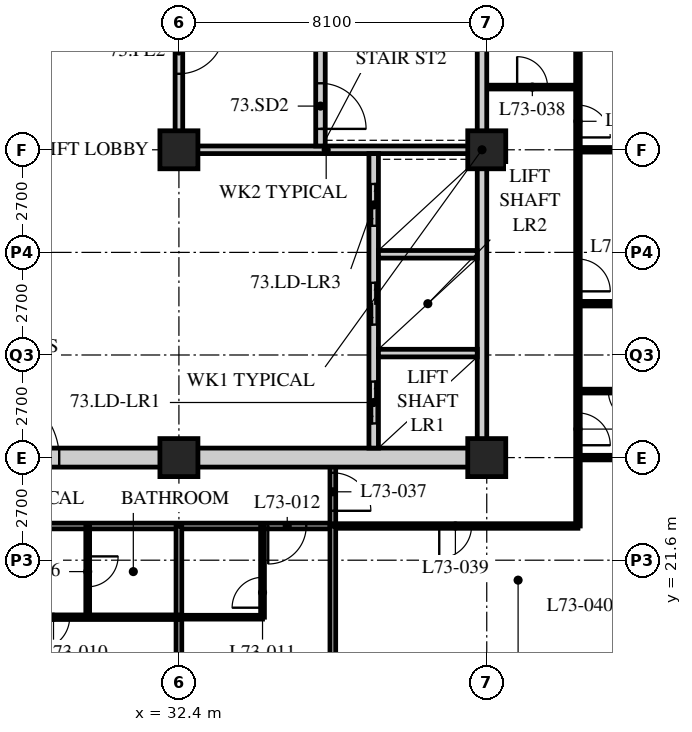
"""IFC4 building model, lengths in metres.
Left out: names, types, materials, properties, quantities, classifications, styles, units other than length and angle.
Written with IfcOpenShell. Run it as: python <this file> out.ifc"""

import sys

from ifc_helpers import new_model, si_unit, direction, frame, frame_2d, origin, origin_2d, place, context, subcontext, project, spatial, rectangle, hollow_rectangle, extrude, element, fill, save


model = new_model("IFC4")
c1 = context("Model", 3, precision=1e-05, world=origin(), true_north=direction((0.0, 1.0)))
c2 = subcontext(c1, "Body", "Model", "MODEL_VIEW")
j1 = project(units=[si_unit("LENGTHUNIT", "METRE"), si_unit("PLANEANGLEUNIT", "RADIAN")], contexts=[c1])
p1 = place(None, origin())
s1 = spatial("IfcSite", under=j1, at=p1, CompositionType="ELEMENT")
p2 = place(p1, origin())
s2 = spatial("IfcBuilding", under=s1, at=p2, CompositionType="ELEMENT")
p3 = place(p2, frame((0.0, 0.0, 285.3)))
s3 = spatial("IfcBuildingStorey", under=s2, at=p3, CompositionType="ELEMENT", Elevation=285.3)
for number, where, z_axis, x_axis in (
    (1, (32.4, 24.3, 0.0), (0.0, 0.0, 1.0), (1.0, 0.0, 0.0)),
    (2, (32.4, 32.4, 0.0), (0.0, 0.0, 1.0), (1.0, 0.0, 0.0)),
    (3, (40.5, 24.3, 0.0), (0.0, 0.0, 1.0), (1.0, 0.0, 0.0)),
    (4, (40.5, 32.4, 0.0), (0.0, 0.0, 1.0), (1.0, 0.0, 0.0)),
):
    element("IfcColumn", number, at=place(p3, frame(where, z_axis=z_axis, x_axis=x_axis)), inside=s3, PredefinedType="COLUMN", context=c2, shape_type="SweptSolid", body=[
        extrude(hollow_rectangle(XDim=1.0, YDim=1.0, WallThickness=0.1, at=origin_2d()), origin(), (0.0, 0.0, 1.0), 3.9),
    ])
p4 = place(p3, frame((12.15, 22.5, 0.0), z_axis=(0.0, 0.0, 1.0), x_axis=(1.0, 0.0, 0.0)))
e5 = element("IfcWall", 5, at=p4, inside=s3, PredefinedType="PARTITIONING", context=c2, shape_type="SweptSolid", body=[
    extrude(rectangle(XDim=24.3, YDim=0.15, at=frame_2d((12.15, 0.0))), origin(), (0.0, 0.0, 1.0), 3.69),
])
p5 = place(p4, frame((4.45, 0.0, 0.0)))
e6 = element("IfcOpeningElement", 6, at=p5, cuts=e5, PredefinedType="OPENING", context=c2, shape_type="SweptSolid", body=[
    extrude(rectangle(XDim=1.0, YDim=2.1, at=frame_2d((0.5, 1.05))), frame((0.0, 0.085, 0.0), z_axis=(0.0, -1.0, 0.0), x_axis=(1.0, 0.0, 0.0)), (0.0, 0.0, 1.0), 0.17),
])
p6 = place(p4, frame((22.6, 0.0, 0.0)))
e7 = element("IfcOpeningElement", 7, at=p6, cuts=e5, PredefinedType="OPENING", context=c2, shape_type="SweptSolid", body=[
    extrude(rectangle(XDim=1.0, YDim=2.1, at=frame_2d((0.5, 1.05))), frame((0.0, 0.085, 0.0), z_axis=(0.0, -1.0, 0.0), x_axis=(1.0, 0.0, 0.0)), (0.0, 0.0, 1.0), 0.17),
])
p7 = place(p4, frame((2.625, 0.0, 0.0)))
e8 = element("IfcOpeningElement", 8, at=p7, cuts=e5, PredefinedType="OPENING", context=c2, shape_type="SweptSolid", body=[
    extrude(rectangle(XDim=1.0, YDim=2.1, at=frame_2d((0.5, 1.05))), frame((0.0, 0.085, 0.0), z_axis=(0.0, -1.0, 0.0), x_axis=(1.0, 0.0, 0.0)), (0.0, 0.0, 1.0), 0.17),
])
p8 = place(p3, frame((36.45, 22.5, 0.0), z_axis=(0.0, 0.0, 1.0), x_axis=(0.0, 1.0, 0.0)))
e9 = element("IfcWall", 9, at=p8, inside=s3, PredefinedType="PARTITIONING", context=c2, shape_type="SweptSolid", body=[
    extrude(rectangle(XDim=1.8, YDim=0.15, at=frame_2d((0.9, 0.0))), origin(), (0.0, 0.0, 1.0), 3.69),
])
p9 = place(p8, frame((0.4, 0.0, 0.0)))
e10 = element("IfcOpeningElement", 10, at=p9, cuts=e9, PredefinedType="OPENING", context=c2, shape_type="SweptSolid", body=[
    extrude(rectangle(XDim=1.0, YDim=2.1, at=frame_2d((0.5, 1.05))), frame((0.0, 0.085, 0.0), z_axis=(0.0, -1.0, 0.0), x_axis=(1.0, 0.0, 0.0)), (0.0, 0.0, 1.0), 0.17),
])
p10 = place(p3, frame((30.0, 22.5, 0.0), z_axis=(0.0, 0.0, 1.0), x_axis=(0.0, -1.0, 0.0)))
e11 = element("IfcWall", 11, at=p10, inside=s3, PredefinedType="PARTITIONING", context=c2, shape_type="SweptSolid", body=[
    extrude(rectangle(XDim=2.4, YDim=0.1, at=frame_2d((1.2, 0.0))), origin(), (0.0, 0.0, 1.0), 3.69),
])
p11 = place(p10, frame((0.8, 0.0, 0.0)))
e12 = element("IfcOpeningElement", 12, at=p11, cuts=e11, PredefinedType="OPENING", context=c2, shape_type="SweptSolid", body=[
    extrude(rectangle(XDim=0.8, YDim=2.1, at=frame_2d((0.4, 1.05))), frame((0.0, 0.06, 0.0), z_axis=(0.0, -1.0, 0.0), x_axis=(1.0, 0.0, 0.0)), (0.0, 0.0, 1.0), 0.12),
])
p12 = place(p3, frame((32.4, 22.5, 0.0), z_axis=(0.0, 0.0, 1.0), x_axis=(0.0, -1.0, 0.0)))
e13 = element("IfcWall", 13, at=p12, inside=s3, PredefinedType="PARTITIONING", context=c2, shape_type="SweptSolid", body=[
    extrude(rectangle(XDim=6.0, YDim=0.15, at=frame_2d((3.0, 0.0))), origin(), (0.0, 0.0, 1.0), 3.078),
])
p13 = place(p3, frame((32.4, 20.1, 0.0), z_axis=(0.0, 0.0, 1.0), x_axis=(1.0, 0.0, 0.0)))
e14 = element("IfcWall", 14, at=p13, inside=s3, PredefinedType="PARTITIONING", context=c2, shape_type="SweptSolid", body=[
    extrude(rectangle(XDim=2.2, YDim=0.1, at=frame_2d((1.1, 0.0))), origin(), (0.0, 0.0, 1.0), 3.69),
])
p14 = place(p3, frame((34.6, 22.5, 0.0), z_axis=(0.0, 0.0, 1.0), x_axis=(0.0, -1.0, 0.0)))
e15 = element("IfcWall", 15, at=p14, inside=s3, PredefinedType="PARTITIONING", context=c2, shape_type="SweptSolid", body=[
    extrude(rectangle(XDim=2.4, YDim=0.1, at=frame_2d((1.2, 0.0))), origin(), (0.0, 0.0, 1.0), 3.69),
])
p15 = place(p14, frame((1.35, 0.0, 0.0)))
e16 = element("IfcOpeningElement", 16, at=p15, cuts=e15, PredefinedType="OPENING", context=c2, shape_type="SweptSolid", body=[
    extrude(rectangle(XDim=0.8, YDim=2.1, at=frame_2d((0.4, 1.05))), frame((0.0, 0.06, 0.0), z_axis=(0.0, -1.0, 0.0), x_axis=(1.0, 0.0, 0.0)), (0.0, 0.0, 1.0), 0.12),
])
p16 = place(p3, frame((12.15, 20.1, 0.0), z_axis=(0.0, 0.0, 1.0), x_axis=(1.0, 0.0, 0.0)))
e17 = element("IfcWall", 17, at=p16, inside=s3, PredefinedType="PARTITIONING", context=c2, shape_type="SweptSolid", body=[
    extrude(rectangle(XDim=20.25, YDim=0.12, at=frame_2d((10.125, 0.0))), origin(), (0.0, 0.0, 1.0), 3.69),
])
p17 = place(p16, frame((5.025, 0.0, 0.0)))
e18 = element("IfcOpeningElement", 18, at=p17, cuts=e17, PredefinedType="OPENING", context=c2, shape_type="SweptSolid", body=[
    extrude(rectangle(XDim=0.85, YDim=2.1, at=frame_2d((0.425, 1.05))), frame((0.0, 0.07, 0.0), z_axis=(0.0, -1.0, 0.0), x_axis=(1.0, 0.0, 0.0)), (0.0, 0.0, 1.0), 0.14),
])
p18 = place(p16, frame((12.475, 0.0, 0.0)))
e19 = element("IfcOpeningElement", 19, at=p18, cuts=e17, PredefinedType="OPENING", context=c2, shape_type="SweptSolid", body=[
    extrude(rectangle(XDim=0.85, YDim=2.1, at=frame_2d((0.425, 1.05))), frame((0.0, 0.07, 0.0), z_axis=(0.0, -1.0, 0.0), x_axis=(1.0, 0.0, 0.0)), (0.0, 0.0, 1.0), 0.14),
])
p19 = place(p16, frame((16.525, 0.0, 0.0)))
e20 = element("IfcOpeningElement", 20, at=p19, cuts=e17, PredefinedType="OPENING", context=c2, shape_type="SweptSolid", body=[
    extrude(rectangle(XDim=0.85, YDim=2.1, at=frame_2d((0.425, 1.05))), frame((0.0, 0.07, 0.0), z_axis=(0.0, -1.0, 0.0), x_axis=(1.0, 0.0, 0.0)), (0.0, 0.0, 1.0), 0.14),
])
p20 = place(p16, frame((2.725, 0.0, 0.0)))
e21 = element("IfcOpeningElement", 21, at=p20, cuts=e17, PredefinedType="OPENING", context=c2, shape_type="SweptSolid", body=[
    extrude(rectangle(XDim=0.85, YDim=2.1, at=frame_2d((0.425, 1.05))), frame((0.0, 0.07, 0.0), z_axis=(0.0, -1.0, 0.0), x_axis=(1.0, 0.0, 0.0)), (0.0, 0.0, 1.0), 0.14),
])
p21 = place(p3, frame((40.5, 34.05, 0.0), z_axis=(0.0, 0.0, 1.0), x_axis=(1.0, 0.0, 0.0)))
e22 = element("IfcWall", 22, at=p21, inside=s3, PredefinedType="PARTITIONING", context=c2, shape_type="SweptSolid", body=[
    extrude(rectangle(XDim=2.4, YDim=0.1, at=frame_2d((1.2, 0.0))), origin(), (0.0, 0.0, 1.0), 3.69),
])
p22 = place(p21, frame((0.8, 0.0, 0.0)))
e23 = element("IfcOpeningElement", 23, at=p22, cuts=e22, PredefinedType="OPENING", context=c2, shape_type="SweptSolid", body=[
    extrude(rectangle(XDim=0.8, YDim=2.1, at=frame_2d((0.4, 1.05))), frame((0.0, 0.06, 0.0), z_axis=(0.0, -1.0, 0.0), x_axis=(1.0, 0.0, 0.0)), (0.0, 0.0, 1.0), 0.12),
])
p23 = place(p3, frame((42.9, 22.5, 0.0), z_axis=(0.0, 0.0, 1.0), x_axis=(0.0, 1.0, 0.0)))
e24 = element("IfcWall", 24, at=p23, inside=s3, PredefinedType="PARTITIONING", context=c2, shape_type="SweptSolid", body=[
    extrude(rectangle(XDim=13.95, YDim=0.12, at=frame_2d((6.975, 0.0))), origin(), (0.0, 0.0, 1.0), 3.69),
])
p24 = place(p23, frame((2.125, 0.0, 0.0)))
e25 = element("IfcOpeningElement", 25, at=p24, cuts=e24, PredefinedType="OPENING", context=c2, shape_type="SweptSolid", body=[
    extrude(rectangle(XDim=0.85, YDim=2.1, at=frame_2d((0.425, 1.05))), frame((0.0, 0.07, 0.0), z_axis=(0.0, -1.0, 0.0), x_axis=(1.0, 0.0, 0.0)), (0.0, 0.0, 1.0), 0.14),
])
p25 = place(p23, frame((6.175, 0.0, 0.0)))
e26 = element("IfcOpeningElement", 26, at=p25, cuts=e24, PredefinedType="OPENING", context=c2, shape_type="SweptSolid", body=[
    extrude(rectangle(XDim=0.85, YDim=2.1, at=frame_2d((0.425, 1.05))), frame((0.0, 0.07, 0.0), z_axis=(0.0, -1.0, 0.0), x_axis=(1.0, 0.0, 0.0)), (0.0, 0.0, 1.0), 0.14),
])
p26 = place(p23, frame((10.225, 0.0, 0.0)))
e27 = element("IfcOpeningElement", 27, at=p26, cuts=e24, PredefinedType="OPENING", context=c2, shape_type="SweptSolid", body=[
    extrude(rectangle(XDim=0.85, YDim=2.1, at=frame_2d((0.425, 1.05))), frame((0.0, 0.07, 0.0), z_axis=(0.0, -1.0, 0.0), x_axis=(1.0, 0.0, 0.0)), (0.0, 0.0, 1.0), 0.14),
])
p27 = place(p3, frame((36.45, 22.5, 0.0), z_axis=(0.0, 0.0, 1.0), x_axis=(1.0, 0.0, 0.0)))
e28 = element("IfcWall", 28, at=p27, inside=s3, PredefinedType="PARTITIONING", context=c2, shape_type="SweptSolid", body=[
    extrude(rectangle(XDim=6.45, YDim=0.12, at=frame_2d((3.225, 0.0))), origin(), (0.0, 0.0, 1.0), 3.69),
])
p28 = place(p27, frame((2.8, 0.0, 0.0)))
e29 = element("IfcOpeningElement", 29, at=p28, cuts=e28, PredefinedType="OPENING", context=c2, shape_type="SweptSolid", body=[
    extrude(rectangle(XDim=0.85, YDim=2.1, at=frame_2d((0.425, 1.05))), frame((0.0, 0.07, 0.0), z_axis=(0.0, -1.0, 0.0), x_axis=(1.0, 0.0, 0.0)), (0.0, 0.0, 1.0), 0.14),
])
p29 = place(p3, frame((42.9, 24.3, 0.0), z_axis=(0.0, 0.0, 1.0), x_axis=(1.0, 0.0, 0.0)))
e30 = element("IfcWall", 30, at=p29, inside=s3, PredefinedType="PARTITIONING", context=c2, shape_type="SweptSolid", body=[
    extrude(rectangle(XDim=9.45, YDim=0.12, at=frame_2d((4.725, 0.0))), origin(), (0.0, 0.0, 1.0), 3.078),
])
p30 = place(p3, frame((36.45, 16.5, 0.0), z_axis=(0.0, 0.0, 1.0), x_axis=(0.0, 1.0, 0.0)))
e31 = element("IfcWall", 31, at=p30, inside=s3, PredefinedType="PARTITIONING", context=c2, shape_type="SweptSolid", body=[
    extrude(rectangle(XDim=6.0, YDim=0.15, at=frame_2d((3.0, 0.0))), origin(), (0.0, 0.0, 1.0), 3.69),
])
p31 = place(p3, frame((42.9, 26.05, 0.0), z_axis=(0.0, 0.0, 1.0), x_axis=(1.0, 0.0, 0.0)))
e32 = element("IfcWall", 32, at=p31, inside=s3, PredefinedType="PARTITIONING", context=c2, shape_type="SweptSolid", body=[
    extrude(rectangle(XDim=2.4, YDim=0.1, at=frame_2d((1.2, 0.0))), origin(), (0.0, 0.0, 1.0), 3.69),
])
p32 = place(p31, frame((0.8, 0.0, 0.0)))
e33 = element("IfcOpeningElement", 33, at=p32, cuts=e32, PredefinedType="OPENING", context=c2, shape_type="SweptSolid", body=[
    extrude(rectangle(XDim=0.8, YDim=2.1, at=frame_2d((0.4, 1.05))), frame((0.0, 0.06, 0.0), z_axis=(0.0, -1.0, 0.0), x_axis=(1.0, 0.0, 0.0)), (0.0, 0.0, 1.0), 0.12),
])
p33 = place(p3, frame((42.9, 28.35, 0.0), z_axis=(0.0, 0.0, 1.0), x_axis=(1.0, 0.0, 0.0)))
e34 = element("IfcWall", 34, at=p33, inside=s3, PredefinedType="PARTITIONING", context=c2, shape_type="SweptSolid", body=[
    extrude(rectangle(XDim=13.5, YDim=0.12, at=frame_2d((6.75, 0.0))), origin(), (0.0, 0.0, 1.0), 3.69),
])
p34 = place(p3, frame((42.9, 32.4, 0.0), z_axis=(0.0, 0.0, 1.0), x_axis=(1.0, 0.0, 0.0)))
e35 = element("IfcWall", 35, at=p34, inside=s3, PredefinedType="PARTITIONING", context=c2, shape_type="SweptSolid", body=[
    extrude(rectangle(XDim=13.5, YDim=0.12, at=frame_2d((6.75, 0.0))), origin(), (0.0, 0.0, 1.0), 3.078),
])
p35 = place(p3, frame((15.95, 24.3, 0.0), z_axis=(0.0, 0.0, 1.0), x_axis=(1.0, 0.0, 0.0)))
e36 = element("IfcWall", 36, at=p35, inside=s3, PredefinedType="SOLIDWALL", context=c2, shape_type="SweptSolid", body=[
    extrude(rectangle(XDim=24.55, YDim=0.5, at=frame_2d((12.275, 0.0))), origin(), (0.0, 0.0, 1.0), 3.04),
])
p36 = place(p35, frame((11.5, 0.0, 0.0)))
e37 = element("IfcOpeningElement", 37, at=p36, cuts=e36, PredefinedType="OPENING", context=c2, shape_type="SweptSolid", body=[
    extrude(rectangle(XDim=1.8, YDim=2.4, at=frame_2d((0.9, 1.2))), frame((0.0, 0.26, 0.0), z_axis=(0.0, -1.0, 0.0), x_axis=(1.0, 0.0, 0.0)), (0.0, 0.0, 1.0), 0.52),
])
p37 = place(p3, frame((40.375, 24.55, 0.0), z_axis=(0.0, 0.0, 1.0), x_axis=(0.0, 1.0, 0.0)))
e38 = element("IfcWall", 38, at=p37, inside=s3, PredefinedType="SOLIDWALL", context=c2, shape_type="SweptSolid", body=[
    extrude(rectangle(XDim=15.7, YDim=0.25, at=frame_2d((7.85, 0.0))), origin(), (0.0, 0.0, 1.0), 3.078),
])
p38 = place(p3, frame((32.3, 32.4, 0.0), z_axis=(0.0, 0.0, 1.0), x_axis=(1.0, 0.0, 0.0)))
e39 = element("IfcWall", 39, at=p38, inside=s3, PredefinedType="SOLIDWALL", context=c2, shape_type="SweptSolid", body=[
    extrude(rectangle(XDim=7.95, YDim=0.2, at=frame_2d((3.975, 0.0))), origin(), (0.0, 0.0, 1.0), 3.078),
])
p39 = place(p3, frame((32.4, 32.5, 0.0), z_axis=(0.0, 0.0, 1.0), x_axis=(0.0, 1.0, 0.0)))
e40 = element("IfcWall", 40, at=p39, inside=s3, PredefinedType="SOLIDWALL", context=c2, shape_type="SweptSolid", body=[
    extrude(rectangle(XDim=7.75, YDim=0.2, at=frame_2d((3.875, 0.0))), origin(), (0.0, 0.0, 1.0), 3.078),
])
p40 = place(p39, frame((1.9, 0.0, 0.0)))
e41 = element("IfcOpeningElement", 41, at=p40, cuts=e40, PredefinedType="OPENING", context=c2, shape_type="SweptSolid", body=[
    extrude(rectangle(XDim=1.2, YDim=2.1, at=frame_2d((0.6, 1.05))), frame((0.0, 0.11, 0.0), z_axis=(0.0, -1.0, 0.0), x_axis=(1.0, 0.0, 0.0)), (0.0, 0.0, 1.0), 0.22),
])
p41 = place(p3, frame((37.525, 24.55, 0.0), z_axis=(0.0, 0.0, 1.0), x_axis=(0.0, 1.0, 0.0)))
e42 = element("IfcWall", 42, at=p41, inside=s3, PredefinedType="SOLIDWALL", context=c2, shape_type="SweptSolid", body=[
    extrude(rectangle(XDim=7.75, YDim=0.25, at=frame_2d((3.875, 0.0))), origin(), (0.0, 0.0, 1.0), 3.69),
])
p42 = place(p41, frame((0.65, 0.0, 0.0)))
e43 = element("IfcOpeningElement", 43, at=p42, cuts=e42, PredefinedType="OPENING", context=c2, shape_type="SweptSolid", body=[
    extrude(rectangle(XDim=1.1, YDim=2.4, at=frame_2d((0.55, 1.2))), frame((0.0, 0.135, 0.0), z_axis=(0.0, -1.0, 0.0), x_axis=(1.0, 0.0, 0.0)), (0.0, 0.0, 1.0), 0.27),
])
p43 = place(p41, frame((3.25, 0.0, 0.0)))
e44 = element("IfcOpeningElement", 44, at=p43, cuts=e42, PredefinedType="OPENING", context=c2, shape_type="SweptSolid", body=[
    extrude(rectangle(XDim=1.1, YDim=2.4, at=frame_2d((0.55, 1.2))), frame((0.0, 0.135, 0.0), z_axis=(0.0, -1.0, 0.0), x_axis=(1.0, 0.0, 0.0)), (0.0, 0.0, 1.0), 0.27),
])
p44 = place(p41, frame((5.85, 0.0, 0.0)))
e45 = element("IfcOpeningElement", 45, at=p44, cuts=e42, PredefinedType="OPENING", context=c2, shape_type="SweptSolid", body=[
    extrude(rectangle(XDim=1.1, YDim=2.4, at=frame_2d((0.55, 1.2))), frame((0.0, 0.135, 0.0), z_axis=(0.0, -1.0, 0.0), x_axis=(1.0, 0.0, 0.0)), (0.0, 0.0, 1.0), 0.27),
])
for number, where, z_axis, x_axis in (
    (46, (37.65, 27.05, 0.0), (0.0, 0.0, 1.0), (1.0, 0.0, 0.0)),
    (47, (37.65, 29.65, 0.0), (0.0, 0.0, 1.0), (1.0, 0.0, 0.0)),
):
    element("IfcWall", number, at=place(p3, frame(where, z_axis=z_axis, x_axis=x_axis)), inside=s3, PredefinedType="SOLIDWALL", context=c2, shape_type="SweptSolid", body=[
        extrude(rectangle(XDim=2.6, YDim=0.2, at=frame_2d((1.3, 0.0))), origin(), (0.0, 0.0, 1.0), 3.69),
    ])
p45 = place(p3, frame((36.125, 32.5, 0.0), z_axis=(0.0, 0.0, 1.0), x_axis=(0.0, 1.0, 0.0)))
e48 = element("IfcWall", 48, at=p45, inside=s3, PredefinedType="SOLIDWALL", context=c2, shape_type="SweptSolid", body=[
    extrude(rectangle(XDim=7.75, YDim=0.25, at=frame_2d((3.875, 0.0))), origin(), (0.0, 0.0, 1.0), 3.69),
])
p46 = place(p45, frame((0.45, 0.0, 0.0)))
e49 = element("IfcOpeningElement", 49, at=p46, cuts=e48, PredefinedType="OPENING", context=c2, shape_type="SweptSolid", body=[
    extrude(rectangle(XDim=1.2, YDim=2.1, at=frame_2d((0.6, 1.05))), frame((0.0, 0.135, 0.0), z_axis=(0.0, -1.0, 0.0), x_axis=(1.0, 0.0, 0.0)), (0.0, 0.0, 1.0), 0.27),
])
p47 = place(p11, origin())
e50 = element("IfcDoor", 50, at=p47, inside=s3, OperationType="SINGLE_SWING_LEFT", PredefinedType="DOOR", context=c2, shape_type="SweptSolid", body=[
    extrude(rectangle(XDim=0.8, YDim=2.1, at=frame_2d((0.4, 1.05))), frame((0.0, 0.025, 0.0), z_axis=(0.0, -1.0, 0.0), x_axis=(1.0, 0.0, 0.0)), (0.0, 0.0, 1.0), 0.05),
])
fill(e12, e50)
p48 = place(p19, origin())
e51 = element("IfcDoor", 51, at=p48, inside=s3, OperationType="SINGLE_SWING_RIGHT", PredefinedType="DOOR", context=c2, shape_type="SweptSolid", body=[
    extrude(rectangle(XDim=0.85, YDim=2.1, at=frame_2d((0.425, 1.05))), frame((0.0, 0.025, 0.0), z_axis=(0.0, -1.0, 0.0), x_axis=(1.0, 0.0, 0.0)), (0.0, 0.0, 1.0), 0.05),
])
fill(e20, e51)
p49 = place(p15, origin())
e52 = element("IfcDoor", 52, at=p49, inside=s3, OperationType="SINGLE_SWING_LEFT", PredefinedType="DOOR", context=c2, shape_type="SweptSolid", body=[
    extrude(rectangle(XDim=0.8, YDim=2.1, at=frame_2d((0.4, 1.05))), frame((0.0, 0.025, 0.0), z_axis=(0.0, -1.0, 0.0), x_axis=(1.0, 0.0, 0.0)), (0.0, 0.0, 1.0), 0.05),
])
fill(e16, e52)
p50 = place(p6, origin())
e53 = element("IfcDoor", 53, at=p50, inside=s3, OperationType="SINGLE_SWING_RIGHT", PredefinedType="DOOR", context=c2, shape_type="SweptSolid", body=[
    extrude(rectangle(XDim=1.0, YDim=2.1, at=frame_2d((0.5, 1.05))), frame((0.0, 0.025, 0.0), z_axis=(0.0, -1.0, 0.0), x_axis=(1.0, 0.0, 0.0)), (0.0, 0.0, 1.0), 0.05),
])
fill(e7, e53)
p51 = place(p9, origin())
e54 = element("IfcDoor", 54, at=p51, inside=s3, OperationType="SINGLE_SWING_RIGHT", PredefinedType="DOOR", context=c2, shape_type="SweptSolid", body=[
    extrude(rectangle(XDim=1.0, YDim=2.1, at=frame_2d((0.5, 1.05))), frame((0.0, 0.025, 0.0), z_axis=(0.0, -1.0, 0.0), x_axis=(1.0, 0.0, 0.0)), (0.0, 0.0, 1.0), 0.05),
])
fill(e10, e54)
p52 = place(p22, origin())
e55 = element("IfcDoor", 55, at=p52, inside=s3, OperationType="SINGLE_SWING_LEFT", PredefinedType="DOOR", context=c2, shape_type="SweptSolid", body=[
    extrude(rectangle(XDim=0.8, YDim=2.1, at=frame_2d((0.4, 1.05))), frame((0.0, 0.025, 0.0), z_axis=(0.0, -1.0, 0.0), x_axis=(1.0, 0.0, 0.0)), (0.0, 0.0, 1.0), 0.05),
])
fill(e23, e55)
p53 = place(p28, origin())
e56 = element("IfcDoor", 56, at=p53, inside=s3, OperationType="SINGLE_SWING_RIGHT", PredefinedType="DOOR", context=c2, shape_type="SweptSolid", body=[
    extrude(rectangle(XDim=0.85, YDim=2.1, at=frame_2d((0.425, 1.05))), frame((0.0, 0.025, 0.0), z_axis=(0.0, -1.0, 0.0), x_axis=(1.0, 0.0, 0.0)), (0.0, 0.0, 1.0), 0.05),
])
fill(e29, e56)
p54 = place(p32, origin())
e57 = element("IfcDoor", 57, at=p54, inside=s3, OperationType="SINGLE_SWING_LEFT", PredefinedType="DOOR", context=c2, shape_type="SweptSolid", body=[
    extrude(rectangle(XDim=0.8, YDim=2.1, at=frame_2d((0.4, 1.05))), frame((0.0, 0.025, 0.0), z_axis=(0.0, -1.0, 0.0), x_axis=(1.0, 0.0, 0.0)), (0.0, 0.0, 1.0), 0.05),
])
fill(e33, e57)
p55 = place(p24, origin())
e58 = element("IfcDoor", 58, at=p55, inside=s3, OperationType="SINGLE_SWING_RIGHT", PredefinedType="DOOR", context=c2, shape_type="SweptSolid", body=[
    extrude(rectangle(XDim=0.85, YDim=2.1, at=frame_2d((0.425, 1.05))), frame((0.0, 0.025, 0.0), z_axis=(0.0, -1.0, 0.0), x_axis=(1.0, 0.0, 0.0)), (0.0, 0.0, 1.0), 0.05),
])
fill(e25, e58)
p56 = place(p25, origin())
e59 = element("IfcDoor", 59, at=p56, inside=s3, OperationType="SINGLE_SWING_RIGHT", PredefinedType="DOOR", context=c2, shape_type="SweptSolid", body=[
    extrude(rectangle(XDim=0.85, YDim=2.1, at=frame_2d((0.425, 1.05))), frame((0.0, 0.025, 0.0), z_axis=(0.0, -1.0, 0.0), x_axis=(1.0, 0.0, 0.0)), (0.0, 0.0, 1.0), 0.05),
])
fill(e26, e59)
p57 = place(p26, origin())
e60 = element("IfcDoor", 60, at=p57, inside=s3, OperationType="SINGLE_SWING_RIGHT", PredefinedType="DOOR", context=c2, shape_type="SweptSolid", body=[
    extrude(rectangle(XDim=0.85, YDim=2.1, at=frame_2d((0.425, 1.05))), frame((0.0, 0.025, 0.0), z_axis=(0.0, -1.0, 0.0), x_axis=(1.0, 0.0, 0.0)), (0.0, 0.0, 1.0), 0.05),
])
fill(e27, e60)
p58 = place(p46, origin())
e61 = element("IfcDoor", 61, at=p58, inside=s3, OperationType="SINGLE_SWING_RIGHT", PredefinedType="DOOR", context=c2, shape_type="SweptSolid", body=[
    extrude(rectangle(XDim=1.2, YDim=2.1, at=frame_2d((0.6, 1.05))), frame((0.0, 0.025, 0.0), z_axis=(0.0, -1.0, 0.0), x_axis=(1.0, 0.0, 0.0)), (0.0, 0.0, 1.0), 0.05),
])
fill(e49, e61)
p59 = place(p40, origin())
e62 = element("IfcDoor", 62, at=p59, inside=s3, OperationType="SINGLE_SWING_LEFT", PredefinedType="DOOR", context=c2, shape_type="SweptSolid", body=[
    extrude(rectangle(XDim=1.2, YDim=2.1, at=frame_2d((0.6, 1.05))), frame((0.0, 0.025, 0.0), z_axis=(0.0, -1.0, 0.0), x_axis=(1.0, 0.0, 0.0)), (0.0, 0.0, 1.0), 0.05),
])
fill(e41, e62)
p60 = place(p42, origin())
e63 = element("IfcDoor", 63, at=p60, inside=s3, OperationType="DOUBLE_DOOR_SLIDING", PredefinedType="DOOR", context=c2, shape_type="SweptSolid", body=[
    extrude(rectangle(XDim=1.1, YDim=2.4, at=frame_2d((0.55, 1.2))), frame((0.0, 0.025, 0.0), z_axis=(0.0, -1.0, 0.0), x_axis=(1.0, 0.0, 0.0)), (0.0, 0.0, 1.0), 0.05),
])
fill(e43, e63)
p61 = place(p43, origin())
e64 = element("IfcDoor", 64, at=p61, inside=s3, OperationType="DOUBLE_DOOR_SLIDING", PredefinedType="DOOR", context=c2, shape_type="SweptSolid", body=[
    extrude(rectangle(XDim=1.1, YDim=2.4, at=frame_2d((0.55, 1.2))), frame((0.0, 0.025, 0.0), z_axis=(0.0, -1.0, 0.0), x_axis=(1.0, 0.0, 0.0)), (0.0, 0.0, 1.0), 0.05),
])
fill(e44, e64)
p62 = place(p44, origin())
e65 = element("IfcDoor", 65, at=p62, inside=s3, OperationType="DOUBLE_DOOR_SLIDING", PredefinedType="DOOR", context=c2, shape_type="SweptSolid", body=[
    extrude(rectangle(XDim=1.1, YDim=2.4, at=frame_2d((0.55, 1.2))), frame((0.0, 0.025, 0.0), z_axis=(0.0, -1.0, 0.0), x_axis=(1.0, 0.0, 0.0)), (0.0, 0.0, 1.0), 0.05),
])
fill(e45, e65)
p63 = place(p36, origin())
e66 = element("IfcDoor", 66, at=p63, inside=s3, OperationType="DOUBLE_DOOR_SINGLE_SWING", PredefinedType="DOOR", context=c2, shape_type="SweptSolid", body=[
    extrude(rectangle(XDim=1.8, YDim=2.4, at=frame_2d((0.9, 1.2))), frame((0.0, 0.025, 0.0), z_axis=(0.0, -1.0, 0.0), x_axis=(1.0, 0.0, 0.0)), (0.0, 0.0, 1.0), 0.05),
])
fill(e37, e66)
save(model, sys.argv[1])
